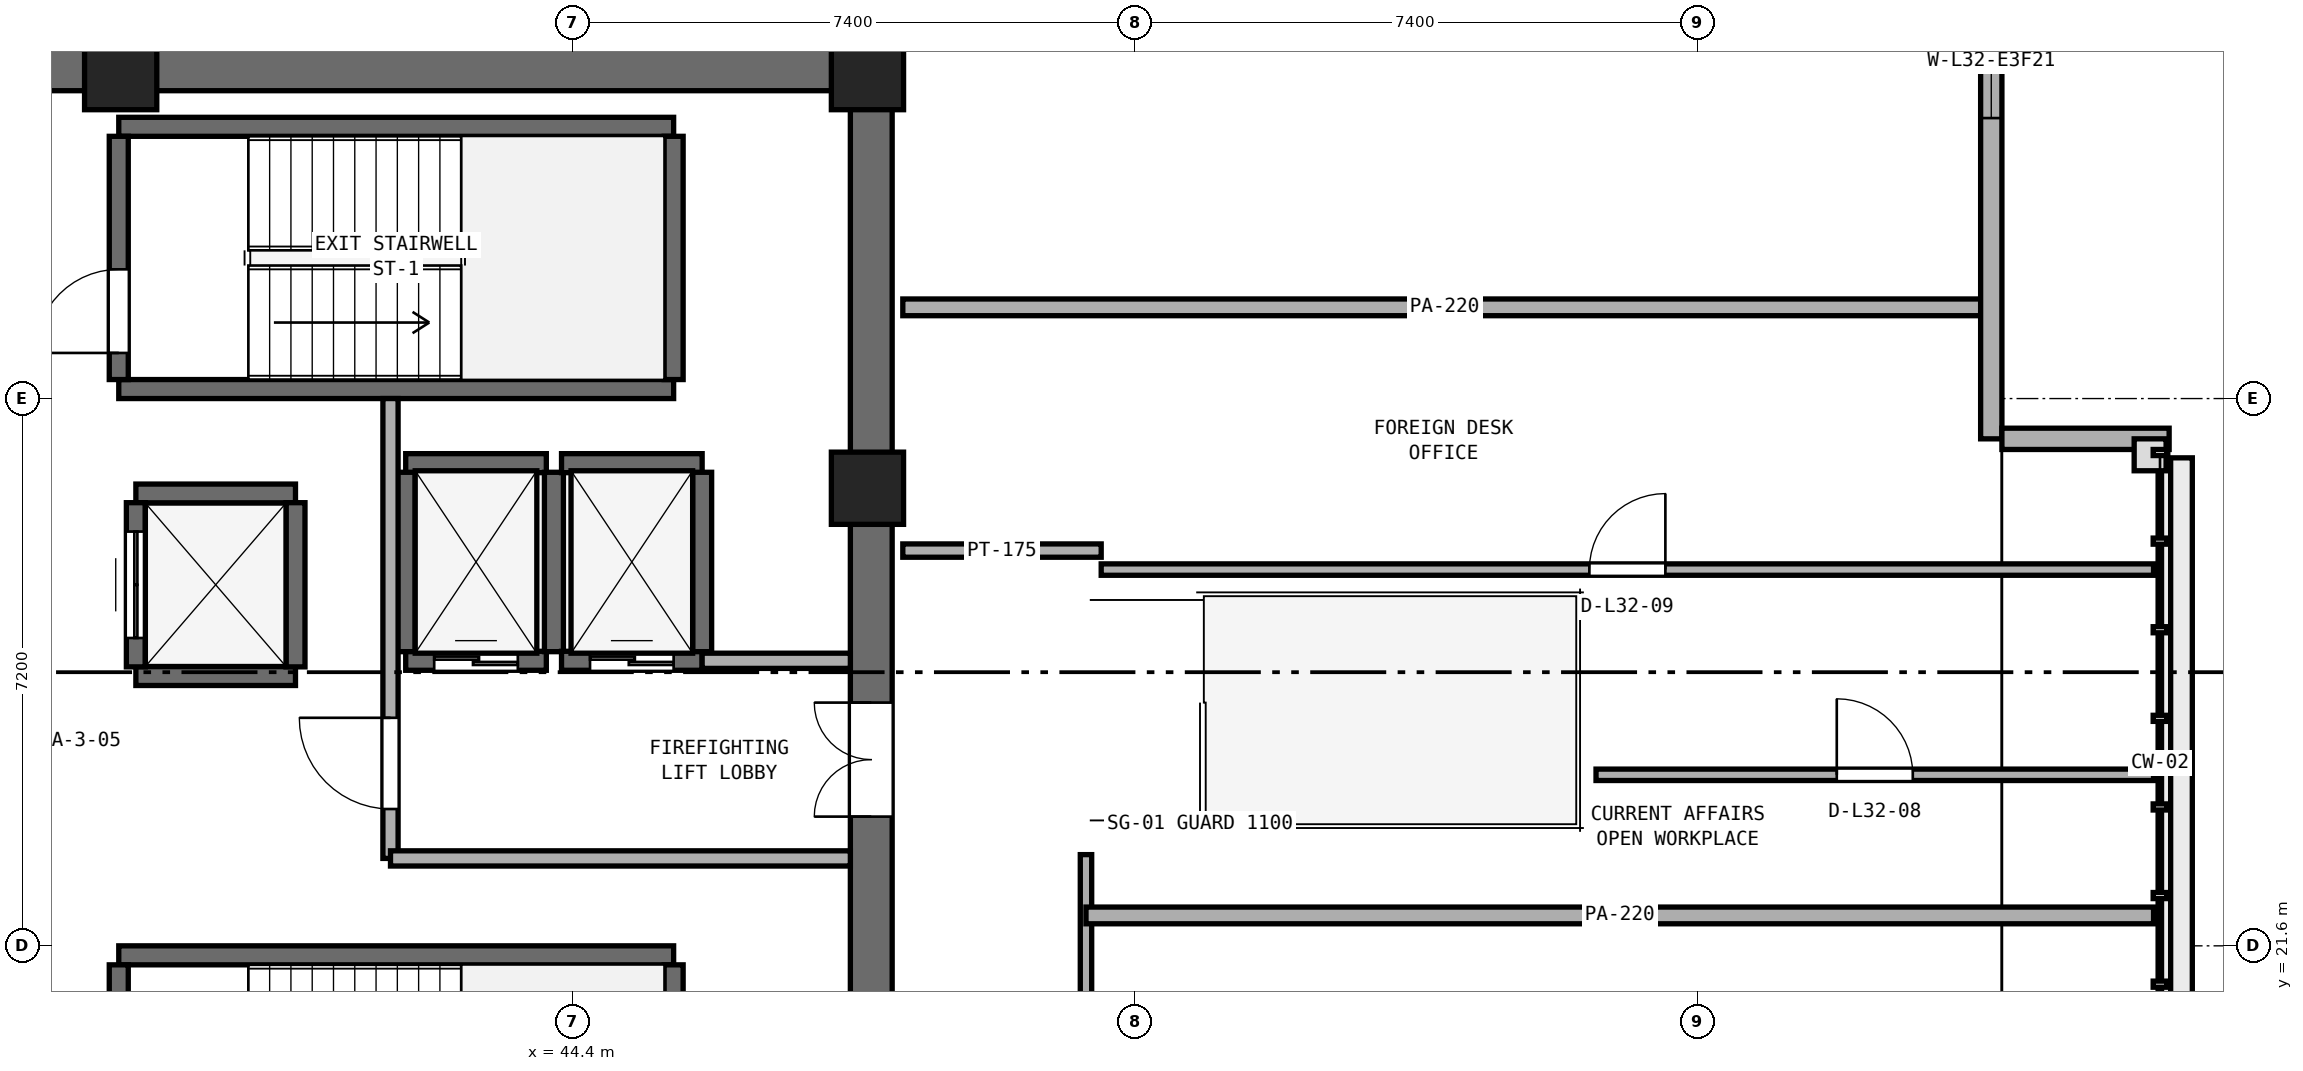
"""IFC4 building model, lengths in metres.
Left out: names, types, materials, properties, quantities, classifications, styles, units other than length and angle.
Written with IfcOpenShell. Run it as: python <this file> out.ifc"""

import sys

from ifc_helpers import new_model, si_unit, direction, frame, frame_2d, origin, origin_2d, place, context, subcontext, project, spatial, rectangle, extrude, element, fill, save


model = new_model("IFC4")
c1 = context("Model", 3, precision=1e-05, world=origin(), true_north=direction((0.0, 1.0)))
c2 = subcontext(c1, "Body", "Model", "MODEL_VIEW")
j1 = project(units=[si_unit("LENGTHUNIT", "METRE"), si_unit("PLANEANGLEUNIT", "RADIAN")], contexts=[c1])
p1 = place(None, origin())
s1 = spatial("IfcSite", under=j1, at=p1, CompositionType="ELEMENT")
p2 = place(p1, origin())
s2 = spatial("IfcBuilding", under=s1, at=p2, CompositionType="ELEMENT")
p3 = place(p2, frame((0.0, 0.0, 128.8)))
s3 = spatial("IfcBuildingStorey", under=s2, at=p3, CompositionType="ELEMENT", Elevation=128.8)
p4 = place(p3, frame((25.4, 33.125, 0.0), z_axis=(0.0, 0.0, 1.0), x_axis=(1.0, 0.0, 0.0)))
e1 = element("IfcWall", 1, at=p4, inside=s3, PredefinedType="SHEAR", context=c2, shape_type="SweptSolid", body=[
    extrude(rectangle(XDim=23.2, YDim=0.55, at=frame_2d((11.6, 0.0))), origin(), (0.0, 0.0, 1.0), 3.54),
])
p5 = place(p3, frame((48.325, 17.55, 0.0), z_axis=(0.0, 0.0, 1.0), x_axis=(0.0, 1.0, 0.0)))
e2 = element("IfcWall", 2, at=p5, inside=s3, PredefinedType="SHEAR", context=c2, shape_type="SweptSolid", body=[
    extrude(rectangle(XDim=15.3, YDim=0.55, at=frame_2d((7.65, 0.0))), origin(), (0.0, 0.0, 1.0), 3.54),
])
p6 = place(p5, frame((5.75, 0.0, 0.0)))
e3 = element("IfcOpeningElement", 3, at=p6, cuts=e2, PredefinedType="OPENING", context=c2, shape_type="SweptSolid", body=[
    extrude(rectangle(XDim=1.5, YDim=2.15, at=frame_2d((0.75, 1.075))), frame((0.0, 0.285, 0.0), z_axis=(0.0, -1.0, 0.0), x_axis=(1.0, 0.0, 0.0)), (0.0, 0.0, 1.0), 0.57),
])
for number, where, z_axis, x_axis in (
    (4, (48.275, 27.62, 0.0), (0.0, 0.0, 1.0), (1.0, 0.0, 0.0)),
    (5, (48.275, 33.075, 0.0), (0.0, 0.0, 1.0), (1.0, 0.0, 0.0)),
    (6, (38.45, 33.075, 0.0), (0.0, 0.0, 1.0), (1.0, 0.0, 0.0)),
):
    element("IfcColumn", number, at=place(p3, frame(where, z_axis=z_axis, x_axis=x_axis)), inside=s3, PredefinedType="PILASTER", context=c2, shape_type="SweptSolid", body=[
        extrude(rectangle(XDim=0.95, YDim=0.95, at=origin_2d()), origin(), (0.0, 0.0, 1.0), 3.8),
    ])
for number, where, z_axis, x_axis in (
    (7, (38.425, 28.925, 0.0), (0.0, 0.0, 1.0), (1.0, 0.0, 0.0)),
    (8, (38.425, 32.375, 0.0), (0.0, 0.0, 1.0), (1.0, 0.0, 0.0)),
):
    element("IfcWall", number, at=place(p3, frame(where, z_axis=z_axis, x_axis=x_axis)), inside=s3, PredefinedType="SHEAR", context=c2, shape_type="SweptSolid", body=[
        extrude(rectangle(XDim=7.3, YDim=0.25, at=frame_2d((3.65, 0.0))), origin(), (0.0, 0.0, 1.0), 3.54),
    ])
p7 = place(p3, frame((38.425, 29.05, 0.0), z_axis=(0.0, 0.0, 1.0), x_axis=(0.0, 1.0, 0.0)))
e9 = element("IfcWall", 9, at=p7, inside=s3, PredefinedType="SHEAR", context=c2, shape_type="SweptSolid", body=[
    extrude(rectangle(XDim=3.2, YDim=0.25, at=frame_2d((1.6, 0.0))), origin(), (0.0, 0.0, 1.0), 3.54),
])
p8 = place(p7, frame((0.35, 0.0, 0.0)))
e10 = element("IfcOpeningElement", 10, at=p8, cuts=e9, PredefinedType="OPENING", context=c2, shape_type="SweptSolid", body=[
    extrude(rectangle(XDim=1.1, YDim=2.15, at=frame_2d((0.55, 1.075))), frame((0.0, 0.135, 0.0), z_axis=(0.0, -1.0, 0.0), x_axis=(1.0, 0.0, 0.0)), (0.0, 0.0, 1.0), 0.27),
])
p9 = place(p3, frame((45.725, 29.05, 0.0), z_axis=(0.0, 0.0, 1.0), x_axis=(0.0, 1.0, 0.0)))
e11 = element("IfcWall", 11, at=p9, inside=s3, PredefinedType="SHEAR", context=c2, shape_type="SweptSolid", body=[
    extrude(rectangle(XDim=3.2, YDim=0.25, at=frame_2d((1.6, 0.0))), origin(), (0.0, 0.0, 1.0), 3.54),
])
p10 = place(p3, frame((38.425, 21.475, 0.0), z_axis=(0.0, 0.0, 1.0), x_axis=(1.0, 0.0, 0.0)))
e12 = element("IfcWall", 12, at=p10, inside=s3, PredefinedType="SHEAR", context=c2, shape_type="SweptSolid", body=[
    extrude(rectangle(XDim=7.3, YDim=0.25, at=frame_2d((3.65, 0.0))), origin(), (0.0, 0.0, 1.0), 3.54),
])
p11 = place(p3, frame((38.425, 18.15, 0.0), z_axis=(0.0, 0.0, 1.0), x_axis=(0.0, 1.0, 0.0)))
e13 = element("IfcWall", 13, at=p11, inside=s3, PredefinedType="SHEAR", context=c2, shape_type="SweptSolid", body=[
    extrude(rectangle(XDim=3.2, YDim=0.25, at=frame_2d((1.6, 0.0))), origin(), (0.0, 0.0, 1.0), 3.54),
])
p12 = place(p11, frame((0.35, 0.0, 0.0)))
e14 = element("IfcOpeningElement", 14, at=p12, cuts=e13, PredefinedType="OPENING", context=c2, shape_type="SweptSolid", body=[
    extrude(rectangle(XDim=1.1, YDim=2.15, at=frame_2d((0.55, 1.075))), frame((0.0, 0.135, 0.0), z_axis=(0.0, -1.0, 0.0), x_axis=(1.0, 0.0, 0.0)), (0.0, 0.0, 1.0), 0.27),
])
p13 = place(p3, frame((45.725, 18.15, 0.0), z_axis=(0.0, 0.0, 1.0), x_axis=(0.0, 1.0, 0.0)))
e15 = element("IfcWall", 15, at=p13, inside=s3, PredefinedType="SHEAR", context=c2, shape_type="SweptSolid", body=[
    extrude(rectangle(XDim=3.2, YDim=0.25, at=frame_2d((1.6, 0.0))), origin(), (0.0, 0.0, 1.0), 3.54),
])
p14 = place(p3, frame((42.2, 25.35, 0.0), z_axis=(0.0, 0.0, 1.0), x_axis=(1.0, 0.0, 0.0)))
e16 = element("IfcWall", 16, at=p14, inside=s3, PredefinedType="SHEAR", context=c2, shape_type="SweptSolid", body=[
    extrude(rectangle(XDim=1.85, YDim=0.25, at=frame_2d((0.925, 0.0))), origin(), (0.0, 0.0, 1.0), 3.54),
])
p15 = place(p14, frame((0.375, 0.0, 0.0)))
e17 = element("IfcOpeningElement", 17, at=p15, cuts=e16, PredefinedType="OPENING", context=c2, shape_type="SweptSolid", body=[
    extrude(rectangle(XDim=1.1, YDim=2.15, at=frame_2d((0.55, 1.075))), frame((0.0, 0.135, 0.0), z_axis=(0.0, -1.0, 0.0), x_axis=(1.0, 0.0, 0.0)), (0.0, 0.0, 1.0), 0.27),
])
p16 = place(p3, frame((42.2, 27.95, 0.0), z_axis=(0.0, 0.0, 1.0), x_axis=(1.0, 0.0, 0.0)))
e18 = element("IfcWall", 18, at=p16, inside=s3, PredefinedType="SHEAR", context=c2, shape_type="SweptSolid", body=[
    extrude(rectangle(XDim=1.85, YDim=0.25, at=frame_2d((0.925, 0.0))), origin(), (0.0, 0.0, 1.0), 3.54),
])
for number, where, z_axis, x_axis in (
    (19, (42.2, 25.47, 0.0), (0.0, 0.0, 1.0), (0.0, 1.0, 0.0)),
    (20, (44.15, 25.47, 0.0), (0.0, 0.0, 1.0), (0.0, 1.0, 0.0)),
):
    element("IfcWall", number, at=place(p3, frame(where, z_axis=z_axis, x_axis=x_axis)), inside=s3, PredefinedType="SHEAR", context=c2, shape_type="SweptSolid", body=[
        extrude(rectangle(XDim=2.36, YDim=0.25, at=frame_2d((1.18, 0.0))), origin(), (0.0, 0.0, 1.0), 3.54),
    ])
p17 = place(p3, frame((44.25, 25.35, 0.0), z_axis=(0.0, 0.0, 1.0), x_axis=(1.0, 0.0, 0.0)))
e21 = element("IfcWall", 21, at=p17, inside=s3, PredefinedType="SHEAR", context=c2, shape_type="SweptSolid", body=[
    extrude(rectangle(XDim=1.85, YDim=0.25, at=frame_2d((0.925, 0.0))), origin(), (0.0, 0.0, 1.0), 3.54),
])
p18 = place(p17, frame((0.375, 0.0, 0.0)))
e22 = element("IfcOpeningElement", 22, at=p18, cuts=e21, PredefinedType="OPENING", context=c2, shape_type="SweptSolid", body=[
    extrude(rectangle(XDim=1.1, YDim=2.15, at=frame_2d((0.55, 1.075))), frame((0.0, 0.135, 0.0), z_axis=(0.0, -1.0, 0.0), x_axis=(1.0, 0.0, 0.0)), (0.0, 0.0, 1.0), 0.27),
])
p19 = place(p3, frame((44.25, 27.95, 0.0), z_axis=(0.0, 0.0, 1.0), x_axis=(1.0, 0.0, 0.0)))
e23 = element("IfcWall", 23, at=p19, inside=s3, PredefinedType="SHEAR", context=c2, shape_type="SweptSolid", body=[
    extrude(rectangle(XDim=1.85, YDim=0.25, at=frame_2d((0.925, 0.0))), origin(), (0.0, 0.0, 1.0), 3.54),
])
p20 = place(p3, frame((46.1, 25.47, 0.0), z_axis=(0.0, 0.0, 1.0), x_axis=(0.0, 1.0, 0.0)))
e24 = element("IfcWall", 24, at=p20, inside=s3, PredefinedType="SHEAR", context=c2, shape_type="SweptSolid", body=[
    extrude(rectangle(XDim=2.36, YDim=0.25, at=frame_2d((1.18, 0.0))), origin(), (0.0, 0.0, 1.0), 3.54),
])
for number, where, z_axis, x_axis in (
    (25, (38.65, 25.15, 0.0), (0.0, 0.0, 1.0), (1.0, 0.0, 0.0)),
    (26, (38.65, 27.55, 0.0), (0.0, 0.0, 1.0), (1.0, 0.0, 0.0)),
):
    element("IfcWall", number, at=place(p3, frame(where, z_axis=z_axis, x_axis=x_axis)), inside=s3, PredefinedType="SHEAR", context=c2, shape_type="SweptSolid", body=[
        extrude(rectangle(XDim=2.1, YDim=0.25, at=frame_2d((1.05, 0.0))), origin(), (0.0, 0.0, 1.0), 3.54),
    ])
p21 = place(p3, frame((38.65, 25.27, 0.0), z_axis=(0.0, 0.0, 1.0), x_axis=(0.0, 1.0, 0.0)))
e27 = element("IfcWall", 27, at=p21, inside=s3, PredefinedType="SHEAR", context=c2, shape_type="SweptSolid", body=[
    extrude(rectangle(XDim=2.16, YDim=0.25, at=frame_2d((1.08, 0.0))), origin(), (0.0, 0.0, 1.0), 3.54),
])
p22 = place(p21, frame((0.38, 0.0, 0.0)))
e28 = element("IfcOpeningElement", 28, at=p22, cuts=e27, PredefinedType="OPENING", context=c2, shape_type="SweptSolid", body=[
    extrude(rectangle(XDim=1.4, YDim=2.2, at=frame_2d((0.7, 1.1))), frame((0.0, 0.135, 0.0), z_axis=(0.0, -1.0, 0.0), x_axis=(1.0, 0.0, 0.0)), (0.0, 0.0, 1.0), 0.27),
])
p23 = place(p3, frame((40.75, 25.27, 0.0), z_axis=(0.0, 0.0, 1.0), x_axis=(0.0, 1.0, 0.0)))
e29 = element("IfcWall", 29, at=p23, inside=s3, PredefinedType="SHEAR", context=c2, shape_type="SweptSolid", body=[
    extrude(rectangle(XDim=2.16, YDim=0.25, at=frame_2d((1.08, 0.0))), origin(), (0.0, 0.0, 1.0), 3.54),
])
p24 = place(p3, frame((42.0, 22.75, 0.0), z_axis=(0.0, 0.0, 1.0), x_axis=(0.0, 1.0, 0.0)))
e30 = element("IfcWall", 30, at=p24, inside=s3, PredefinedType="SOLIDWALL", context=c2, shape_type="SweptSolid", body=[
    extrude(rectangle(XDim=6.05, YDim=0.2, at=frame_2d((3.025, 0.0))), origin(), (0.0, 0.0, 1.0), 3.54),
])
p25 = place(p24, frame((0.65, 0.0, 0.0)))
e31 = element("IfcOpeningElement", 31, at=p25, cuts=e30, PredefinedType="OPENING", context=c2, shape_type="SweptSolid", body=[
    extrude(rectangle(XDim=1.2, YDim=2.15, at=frame_2d((0.6, 1.075))), frame((0.0, 0.11, 0.0), z_axis=(0.0, -1.0, 0.0), x_axis=(1.0, 0.0, 0.0)), (0.0, 0.0, 1.0), 0.22),
])
p26 = place(p3, frame((42.0, 22.75, 0.0), z_axis=(0.0, 0.0, 1.0), x_axis=(1.0, 0.0, 0.0)))
e32 = element("IfcWall", 32, at=p26, inside=s3, PredefinedType="SOLIDWALL", context=c2, shape_type="SweptSolid", body=[
    extrude(rectangle(XDim=6.05, YDim=0.2, at=frame_2d((3.025, 0.0))), origin(), (0.0, 0.0, 1.0), 3.54),
])
p27 = place(p3, frame((46.1, 25.35, 0.0), z_axis=(0.0, 0.0, 1.0), x_axis=(1.0, 0.0, 0.0)))
e33 = element("IfcWall", 33, at=p27, inside=s3, PredefinedType="SOLIDWALL", context=c2, shape_type="SweptSolid", body=[
    extrude(rectangle(XDim=1.95, YDim=0.2, at=frame_2d((0.975, 0.0))), origin(), (0.0, 0.0, 1.0), 3.54),
])
p28 = place(p3, frame((51.15, 4.823, 0.0), z_axis=(0.0, 0.0, 1.0), x_axis=(0.0, 1.0, 0.0)))
e34 = element("IfcWall", 34, at=p28, inside=s3, PredefinedType="PARTITIONING", context=c2, shape_type="SweptSolid", body=[
    extrude(rectangle(XDim=17.978, YDim=0.15, at=frame_2d((8.989, 0.0))), origin(), (0.0, 0.0, 1.0), 3.54),
])
p29 = place(p28, frame((12.952, 0.0, 0.0)))
e35 = element("IfcOpeningElement", 35, at=p29, cuts=e34, PredefinedType="OPENING", context=c2, shape_type="SweptSolid", body=[
    extrude(rectangle(XDim=0.9, YDim=2.1, at=frame_2d((0.45, 1.05))), frame((0.0, 0.085, 0.0), z_axis=(0.0, -1.0, 0.0), x_axis=(1.0, 0.0, 0.0)), (0.0, 0.0, 1.0), 0.17),
])
p30 = place(p3, frame((51.15, 22.0, 0.0), z_axis=(0.0, 0.0, 1.0), x_axis=(1.0, 0.0, 0.0)))
e36 = element("IfcWall", 36, at=p30, inside=s3, PredefinedType="PARTITIONING", context=c2, shape_type="SweptSolid", body=[
    extrude(rectangle(XDim=14.045, YDim=0.22, at=frame_2d((7.022, 0.0))), origin(), (0.0, 0.0, 1.0), 3.54),
])
p31 = place(p3, frame((57.86, 23.85, 0.0), z_axis=(0.0, 0.0, 1.0), x_axis=(1.0, 0.0, 0.0)))
e37 = element("IfcWall", 37, at=p31, inside=s3, PredefinedType="PARTITIONING", context=c2, shape_type="SweptSolid", body=[
    extrude(rectangle(XDim=7.335, YDim=0.15, at=frame_2d((3.667, 0.0))), origin(), (0.0, 0.0, 1.0), 3.54),
])
p32 = place(p31, frame((3.167, 0.0, 0.0)))
e38 = element("IfcOpeningElement", 38, at=p32, cuts=e37, PredefinedType="OPENING", context=c2, shape_type="SweptSolid", body=[
    extrude(rectangle(XDim=1.0, YDim=2.12, at=frame_2d((0.5, 1.06))), frame((0.0, 0.085, 0.0), z_axis=(0.0, -1.0, 0.0), x_axis=(1.0, 0.0, 0.0)), (0.0, 0.0, 1.0), 0.17),
])
p33 = place(p3, frame((51.35, 26.55, 0.0), z_axis=(0.0, 0.0, 1.0), x_axis=(1.0, 0.0, 0.0)))
e39 = element("IfcWall", 39, at=p33, inside=s3, PredefinedType="PARTITIONING", context=c2, shape_type="SweptSolid", body=[
    extrude(rectangle(XDim=13.845, YDim=0.15, at=frame_2d((6.922, 0.0))), origin(), (0.0, 0.0, 1.0), 3.54),
])
p34 = place(p33, frame((6.423, 0.0, 0.0)))
e40 = element("IfcOpeningElement", 40, at=p34, cuts=e39, PredefinedType="OPENING", context=c2, shape_type="SweptSolid", body=[
    extrude(rectangle(XDim=1.0, YDim=2.12, at=frame_2d((0.5, 1.06))), frame((0.0, 0.085, 0.0), z_axis=(0.0, -1.0, 0.0), x_axis=(1.0, 0.0, 0.0)), (0.0, 0.0, 1.0), 0.17),
])
p35 = place(p3, frame((48.74, 26.8, 0.0), z_axis=(0.0, 0.0, 1.0), x_axis=(1.0, 0.0, 0.0)))
e41 = element("IfcWall", 41, at=p35, inside=s3, PredefinedType="PARTITIONING", context=c2, shape_type="SweptSolid", body=[
    extrude(rectangle(XDim=2.61, YDim=0.175, at=frame_2d((1.305, 0.0))), origin(), (0.0, 0.0, 1.0), 3.54),
])
p36 = place(p3, frame((48.74, 30.0, 0.0), z_axis=(0.0, 0.0, 1.0), x_axis=(1.0, 0.0, 0.0)))
e42 = element("IfcWall", 42, at=p36, inside=s3, PredefinedType="PARTITIONING", context=c2, shape_type="SweptSolid", body=[
    extrude(rectangle(XDim=14.255, YDim=0.22, at=frame_2d((7.127, 0.0))), origin(), (0.0, 0.0, 1.0), 3.54),
])
p37 = place(p3, frame((63.06, 28.27, 0.0), z_axis=(0.0, 0.0, 1.0), x_axis=(0.0, 1.0, 0.0)))
e43 = element("IfcWall", 43, at=p37, inside=s3, PredefinedType="STANDARD", context=c2, shape_type="SweptSolid", body=[
    extrude(rectangle(XDim=6.96, YDim=0.28, at=frame_2d((3.48, 0.0))), origin(), (0.0, 0.0, 1.0), 3.54),
])
p38 = place(p37, frame((4.22, 0.0, 0.9)))
e44 = element("IfcOpeningElement", 44, at=p38, cuts=e43, PredefinedType="OPENING", context=c2, shape_type="SweptSolid", body=[
    extrude(rectangle(XDim=1.5, YDim=1.65, at=frame_2d((0.75, 0.825))), frame((0.0, 0.15, 0.0), z_axis=(0.0, -1.0, 0.0), x_axis=(1.0, 0.0, 0.0)), (0.0, 0.0, 1.0), 0.3),
])
p39 = place(p3, frame((63.2, 28.27, 0.0), z_axis=(0.0, 0.0, 1.0), x_axis=(1.0, 0.0, 0.0)))
e45 = element("IfcWall", 45, at=p39, inside=s3, PredefinedType="STANDARD", context=c2, shape_type="SweptSolid", body=[
    extrude(rectangle(XDim=2.2, YDim=0.28, at=frame_2d((1.1, 0.0))), origin(), (0.0, 0.0, 1.0), 3.54),
])
p40 = place(p8, origin())
e46 = element("IfcDoor", 46, at=p40, inside=s3, OperationType="SINGLE_SWING_LEFT", PredefinedType="DOOR", context=c2, shape_type="SweptSolid", body=[
    extrude(rectangle(XDim=1.1, YDim=2.15, at=frame_2d((0.55, 1.075))), frame((0.0, 0.025, 0.0), z_axis=(0.0, -1.0, 0.0), x_axis=(1.0, 0.0, 0.0)), (0.0, 0.0, 1.0), 0.05),
])
fill(e10, e46)
p41 = place(p15, origin())
e47 = element("IfcDoor", 47, at=p41, inside=s3, OperationType="DOUBLE_DOOR_SLIDING", PredefinedType="DOOR", context=c2, shape_type="SweptSolid", body=[
    extrude(rectangle(XDim=1.1, YDim=2.15, at=frame_2d((0.55, 1.075))), frame((0.0, 0.025, 0.0), z_axis=(0.0, -1.0, 0.0), x_axis=(1.0, 0.0, 0.0)), (0.0, 0.0, 1.0), 0.05),
])
fill(e17, e47)
p42 = place(p18, origin())
e48 = element("IfcDoor", 48, at=p42, inside=s3, OperationType="DOUBLE_DOOR_SLIDING", PredefinedType="DOOR", context=c2, shape_type="SweptSolid", body=[
    extrude(rectangle(XDim=1.1, YDim=2.15, at=frame_2d((0.55, 1.075))), frame((0.0, 0.025, 0.0), z_axis=(0.0, -1.0, 0.0), x_axis=(1.0, 0.0, 0.0)), (0.0, 0.0, 1.0), 0.05),
])
fill(e22, e48)
p43 = place(p22, origin())
e49 = element("IfcDoor", 49, at=p43, inside=s3, OperationType="DOUBLE_DOOR_SLIDING", PredefinedType="DOOR", context=c2, shape_type="SweptSolid", body=[
    extrude(rectangle(XDim=1.4, YDim=2.2, at=frame_2d((0.7, 1.1))), frame((0.0, 0.025, 0.0), z_axis=(0.0, -1.0, 0.0), x_axis=(1.0, 0.0, 0.0)), (0.0, 0.0, 1.0), 0.05),
])
fill(e28, e49)
p44 = place(p25, origin())
e50 = element("IfcDoor", 50, at=p44, inside=s3, OperationType="SINGLE_SWING_RIGHT", PredefinedType="DOOR", context=c2, shape_type="SweptSolid", body=[
    extrude(rectangle(XDim=1.2, YDim=2.15, at=frame_2d((0.6, 1.075))), frame((0.0, 0.025, 0.0), z_axis=(0.0, -1.0, 0.0), x_axis=(1.0, 0.0, 0.0)), (0.0, 0.0, 1.0), 0.05),
])
fill(e31, e50)
p45 = place(p6, origin())
e51 = element("IfcDoor", 51, at=p45, inside=s3, OperationType="DOUBLE_DOOR_SINGLE_SWING", PredefinedType="DOOR", context=c2, shape_type="SweptSolid", body=[
    extrude(rectangle(XDim=1.5, YDim=2.15, at=frame_2d((0.75, 1.075))), frame((0.0, 0.025, 0.0), z_axis=(0.0, -1.0, 0.0), x_axis=(1.0, 0.0, 0.0)), (0.0, 0.0, 1.0), 0.05),
])
fill(e3, e51)
p46 = place(p32, origin())
e52 = element("IfcDoor", 52, at=p46, inside=s3, OperationType="SINGLE_SWING_LEFT", PredefinedType="DOOR", context=c2, shape_type="SweptSolid", body=[
    extrude(rectangle(XDim=1.0, YDim=2.12, at=frame_2d((0.5, 1.06))), frame((0.0, 0.025, 0.0), z_axis=(0.0, -1.0, 0.0), x_axis=(1.0, 0.0, 0.0)), (0.0, 0.0, 1.0), 0.05),
])
fill(e38, e52)
p47 = place(p34, origin())
e53 = element("IfcDoor", 53, at=p47, inside=s3, OperationType="SINGLE_SWING_RIGHT", PredefinedType="DOOR", context=c2, shape_type="SweptSolid", body=[
    extrude(rectangle(XDim=1.0, YDim=2.12, at=frame_2d((0.5, 1.06))), frame((0.0, 0.025, 0.0), z_axis=(0.0, -1.0, 0.0), x_axis=(1.0, 0.0, 0.0)), (0.0, 0.0, 1.0), 0.05),
])
fill(e40, e53)
p48 = place(p38, origin())
e54 = element("IfcWindow", 54, at=p48, inside=s3, PartitioningType="SINGLE_PANEL", PredefinedType="WINDOW", context=c2, shape_type="SweptSolid", body=[
    extrude(rectangle(XDim=1.5, YDim=1.65, at=frame_2d((0.75, 0.825))), frame((0.0, 0.03, 0.0), z_axis=(0.0, -1.0, 0.0), x_axis=(1.0, 0.0, 0.0)), (0.0, 0.0, 1.0), 0.06),
])
fill(e44, e54)
save(model, sys.argv[1])
